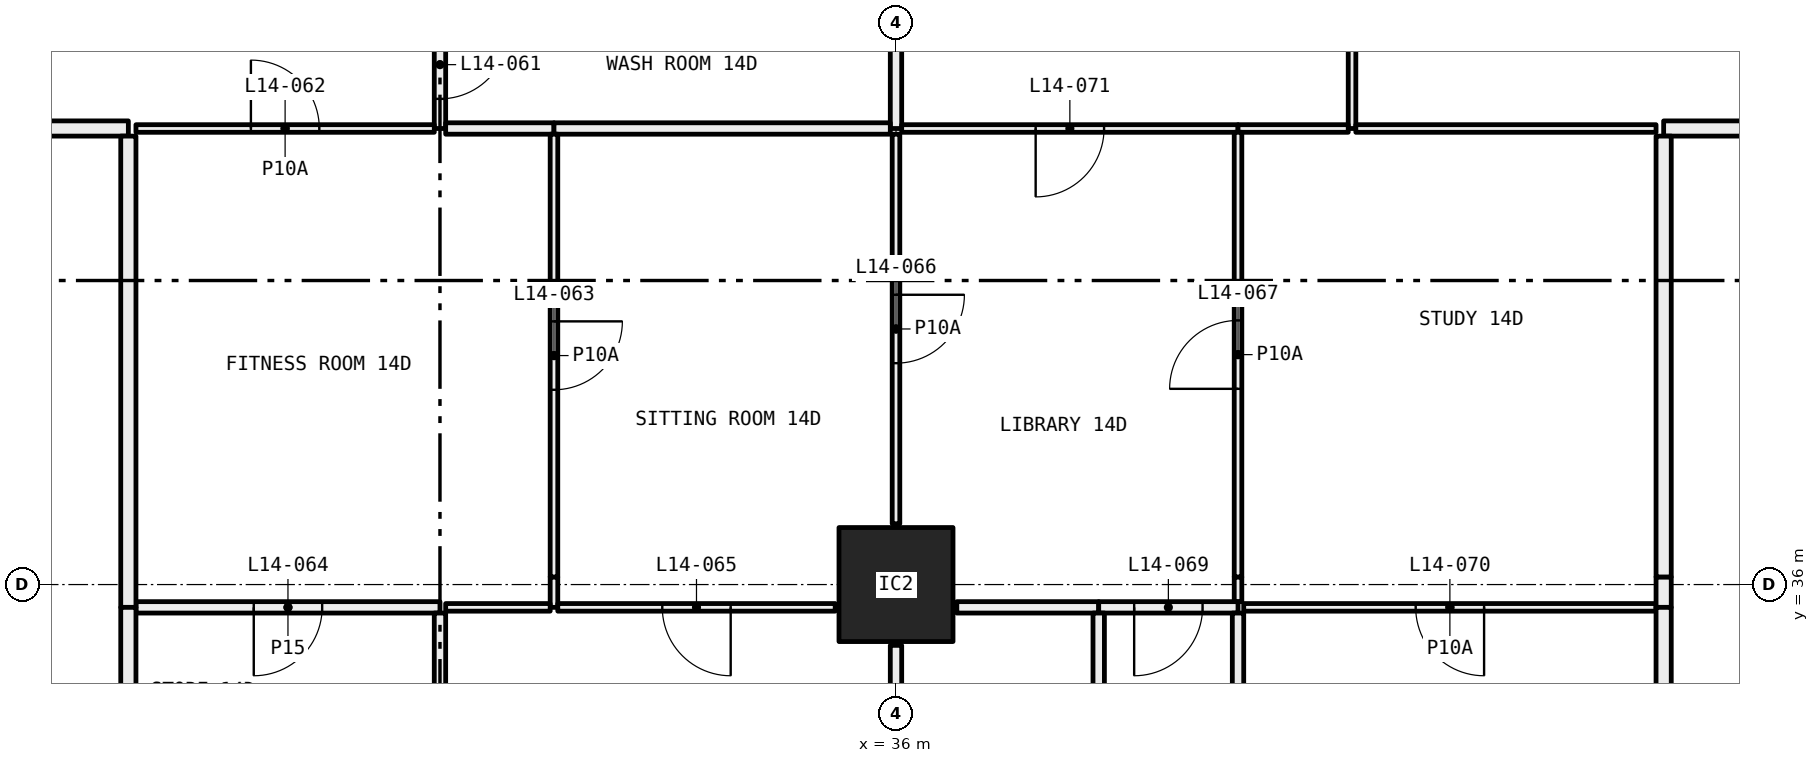
"""IFC4 building model, lengths in metres.
Left out: names, types, materials, properties, quantities, classifications, styles, units other than length and angle.
Written with IfcOpenShell. Run it as: python <this file> out.ifc"""

import sys

from ifc_helpers import new_model, si_unit, direction, frame, frame_2d, origin, origin_2d, place, context, subcontext, project, spatial, rectangle, hollow_rectangle, extrude, element, fill, save


model = new_model("IFC4")
c1 = context("Model", 3, precision=1e-05, world=origin(), true_north=direction((0.0, 1.0)))
c2 = subcontext(c1, "Body", "Model", "MODEL_VIEW")
j1 = project(units=[si_unit("LENGTHUNIT", "METRE"), si_unit("PLANEANGLEUNIT", "RADIAN")], contexts=[c1])
p1 = place(None, origin())
s1 = spatial("IfcSite", under=j1, at=p1, CompositionType="ELEMENT")
p2 = place(p1, origin())
s2 = spatial("IfcBuilding", under=s1, at=p2, CompositionType="ELEMENT")
p3 = place(p2, frame((0.0, 0.0, 61.05)))
s3 = spatial("IfcBuildingStorey", under=s2, at=p3, CompositionType="ELEMENT", Elevation=61.05)
p4 = place(p3, frame((36.0, 36.0, 0.0), z_axis=(0.0, 0.0, 1.0), x_axis=(1.0, 0.0, 0.0)))
e1 = element("IfcColumn", 1, at=p4, inside=s3, PredefinedType="COLUMN", context=c2, shape_type="SweptSolid", body=[
    extrude(hollow_rectangle(XDim=1.5, YDim=1.5, WallThickness=0.065, at=origin_2d()), origin(), (0.0, 0.0, 1.0), 3.05),
])
p5 = place(p3, frame((30.0, 42.0, 0.0), z_axis=(0.0, 0.0, 1.0), x_axis=(0.0, 1.0, 0.0)))
e2 = element("IfcWall", 2, at=p5, inside=s3, PredefinedType="PARTITIONING", context=c2, shape_type="SweptSolid", body=[
    extrude(rectangle(XDim=1.68, YDim=0.15, at=frame_2d((0.84, 0.0))), origin(), (0.0, 0.0, 1.0), 3.05),
])
p6 = place(p5, frame((0.39, 0.0, 0.0)))
e3 = element("IfcOpeningElement", 3, at=p6, cuts=e2, PredefinedType="OPENING", context=c2, shape_type="SweptSolid", body=[
    extrude(rectangle(XDim=0.9, YDim=2.1, at=frame_2d((0.45, 1.05))), frame((0.0, 0.085, 0.0), z_axis=(0.0, -1.0, 0.0), x_axis=(1.0, 0.0, 0.0)), (0.0, 0.0, 1.0), 0.17),
])
p7 = place(p3, frame((26.0, 42.0, 0.0), z_axis=(0.0, 0.0, 1.0), x_axis=(1.0, 0.0, 0.0)))
e4 = element("IfcWall", 4, at=p7, inside=s3, PredefinedType="PARTITIONING", context=c2, shape_type="SweptSolid", body=[
    extrude(rectangle(XDim=3.925, YDim=0.1, at=frame_2d((1.962, 0.0))), origin(), (0.0, 0.0, 1.0), 3.05),
])
p8 = place(p7, frame((1.512, 0.0, 0.0)))
e5 = element("IfcOpeningElement", 5, at=p8, cuts=e4, PredefinedType="OPENING", context=c2, shape_type="SweptSolid", body=[
    extrude(rectangle(XDim=0.9, YDim=2.1, at=frame_2d((0.45, 1.05))), frame((0.0, 0.06, 0.0), z_axis=(0.0, -1.0, 0.0), x_axis=(1.0, 0.0, 0.0)), (0.0, 0.0, 1.0), 0.12),
])
p9 = place(p3, frame((24.0, 42.0, 0.0), z_axis=(0.0, 0.0, 1.0), x_axis=(1.0, 0.0, 0.0)))
e6 = element("IfcWall", 6, at=p9, inside=s3, PredefinedType="PARTITIONING", context=c2, shape_type="SweptSolid", body=[
    extrude(rectangle(XDim=1.9, YDim=0.2, at=frame_2d((0.95, 0.0))), origin(), (0.0, 0.0, 1.0), 3.05),
])
p10 = place(p3, frame((36.0, 42.0, 0.0), z_axis=(0.0, 0.0, 1.0), x_axis=(0.0, 1.0, 0.0)))
e7 = element("IfcWall", 7, at=p10, inside=s3, PredefinedType="PARTITIONING", context=c2, shape_type="SweptSolid", body=[
    extrude(rectangle(XDim=1.605, YDim=0.15, at=frame_2d((0.802, 0.0))), origin(), (0.0, 0.0, 1.0), 2.45),
])
p11 = place(p3, frame((30.075, 42.0, 0.0), z_axis=(0.0, 0.0, 1.0), x_axis=(1.0, 0.0, 0.0)))
e8 = element("IfcWall", 8, at=p11, inside=s3, PredefinedType="PARTITIONING", context=c2, shape_type="SweptSolid", body=[
    extrude(rectangle(XDim=1.425, YDim=0.15, at=frame_2d((0.712, 0.0))), origin(), (0.0, 0.0, 1.0), 3.05),
])
p12 = place(p3, frame((31.5, 42.0, 0.0), z_axis=(0.0, 0.0, 1.0), x_axis=(1.0, 0.0, 0.0)))
e9 = element("IfcWall", 9, at=p12, inside=s3, PredefinedType="PARTITIONING", context=c2, shape_type="SweptSolid", body=[
    extrude(rectangle(XDim=4.425, YDim=0.15, at=frame_2d((2.212, 0.0))), origin(), (0.0, 0.0, 1.0), 2.45),
])
p13 = place(p3, frame((42.0, 42.0, 0.0), z_axis=(0.0, 0.0, 1.0), x_axis=(0.0, 1.0, 0.0)))
e10 = element("IfcWall", 10, at=p13, inside=s3, PredefinedType="PARTITIONING", context=c2, shape_type="SweptSolid", body=[
    extrude(rectangle(XDim=5.28, YDim=0.1, at=frame_2d((2.64, 0.0))), origin(), (0.0, 0.0, 1.0), 3.05),
])
p14 = place(p13, frame((2.19, 0.0, 0.0)))
e11 = element("IfcOpeningElement", 11, at=p14, cuts=e10, PredefinedType="OPENING", context=c2, shape_type="SweptSolid", body=[
    extrude(rectangle(XDim=0.9, YDim=2.1, at=frame_2d((0.45, 1.05))), frame((0.0, 0.06, 0.0), z_axis=(0.0, -1.0, 0.0), x_axis=(1.0, 0.0, 0.0)), (0.0, 0.0, 1.0), 0.12),
])
p15 = place(p3, frame((36.075, 42.0, 0.0), z_axis=(0.0, 0.0, 1.0), x_axis=(1.0, 0.0, 0.0)))
e12 = element("IfcWall", 12, at=p15, inside=s3, PredefinedType="PARTITIONING", context=c2, shape_type="SweptSolid", body=[
    extrude(rectangle(XDim=4.425, YDim=0.1, at=frame_2d((2.212, 0.0))), origin(), (0.0, 0.0, 1.0), 2.45),
])
p16 = place(p15, frame((1.762, 0.0, 0.0)))
e13 = element("IfcOpeningElement", 13, at=p16, cuts=e12, PredefinedType="OPENING", context=c2, shape_type="SweptSolid", body=[
    extrude(rectangle(XDim=0.9, YDim=2.1, at=frame_2d((0.45, 1.05))), frame((0.0, 0.06, 0.0), z_axis=(0.0, -1.0, 0.0), x_axis=(1.0, 0.0, 0.0)), (0.0, 0.0, 1.0), 0.12),
])
p17 = place(p3, frame((40.5, 42.0, 0.0), z_axis=(0.0, 0.0, 1.0), x_axis=(1.0, 0.0, 0.0)))
e14 = element("IfcWall", 14, at=p17, inside=s3, PredefinedType="PARTITIONING", context=c2, shape_type="SweptSolid", body=[
    extrude(rectangle(XDim=1.45, YDim=0.1, at=frame_2d((0.725, 0.0))), origin(), (0.0, 0.0, 1.0), 3.05),
])
p18 = place(p3, frame((42.05, 42.0, 0.0), z_axis=(0.0, 0.0, 1.0), x_axis=(1.0, 0.0, 0.0)))
e15 = element("IfcWall", 15, at=p18, inside=s3, PredefinedType="PARTITIONING", context=c2, shape_type="SweptSolid", body=[
    extrude(rectangle(XDim=3.95, YDim=0.1, at=frame_2d((1.975, 0.0))), origin(), (0.0, 0.0, 1.0), 3.05),
])
p19 = place(p3, frame((46.1, 42.0, 0.0), z_axis=(0.0, 0.0, 1.0), x_axis=(1.0, 0.0, 0.0)))
e16 = element("IfcWall", 16, at=p19, inside=s3, PredefinedType="PARTITIONING", context=c2, shape_type="SweptSolid", body=[
    extrude(rectangle(XDim=1.9, YDim=0.2, at=frame_2d((0.95, 0.0))), origin(), (0.0, 0.0, 1.0), 3.05),
])
p20 = place(p3, frame((31.5, 35.7, 0.0), z_axis=(0.0, 0.0, 1.0), x_axis=(0.0, 1.0, 0.0)))
e17 = element("IfcWall", 17, at=p20, inside=s3, PredefinedType="PARTITIONING", context=c2, shape_type="SweptSolid", body=[
    extrude(rectangle(XDim=0.4, YDim=0.1, at=frame_2d((0.2, 0.0))), origin(), (0.0, 0.0, 1.0), 2.45),
])
p21 = place(p3, frame((31.5, 36.1, 0.0), z_axis=(0.0, 0.0, 1.0), x_axis=(0.0, 1.0, 0.0)))
e18 = element("IfcWall", 18, at=p21, inside=s3, PredefinedType="PARTITIONING", context=c2, shape_type="SweptSolid", body=[
    extrude(rectangle(XDim=5.825, YDim=0.1, at=frame_2d((2.913, 0.0))), origin(), (0.0, 0.0, 1.0), 3.05),
])
p22 = place(p21, frame((2.462, 0.0, 0.0)))
e19 = element("IfcOpeningElement", 19, at=p22, cuts=e18, PredefinedType="OPENING", context=c2, shape_type="SweptSolid", body=[
    extrude(rectangle(XDim=0.9, YDim=2.1, at=frame_2d((0.45, 1.05))), frame((0.0, 0.06, 0.0), z_axis=(0.0, -1.0, 0.0), x_axis=(1.0, 0.0, 0.0)), (0.0, 0.0, 1.0), 0.12),
])
p23 = place(p3, frame((26.0, 35.7, 0.0), z_axis=(0.0, 0.0, 1.0), x_axis=(1.0, 0.0, 0.0)))
e20 = element("IfcWall", 20, at=p23, inside=s3, PredefinedType="PARTITIONING", context=c2, shape_type="SweptSolid", body=[
    extrude(rectangle(XDim=4.0, YDim=0.15, at=frame_2d((2.0, 0.0))), origin(), (0.0, 0.0, 1.0), 3.05),
])
p24 = place(p23, frame((1.55, 0.0, 0.0)))
e21 = element("IfcOpeningElement", 21, at=p24, cuts=e20, PredefinedType="OPENING", context=c2, shape_type="SweptSolid", body=[
    extrude(rectangle(XDim=0.9, YDim=2.1, at=frame_2d((0.45, 1.05))), frame((0.0, 0.085, 0.0), z_axis=(0.0, -1.0, 0.0), x_axis=(1.0, 0.0, 0.0)), (0.0, 0.0, 1.0), 0.17),
])
p25 = place(p3, frame((30.075, 35.7, 0.0), z_axis=(0.0, 0.0, 1.0), x_axis=(1.0, 0.0, 0.0)))
e22 = element("IfcWall", 22, at=p25, inside=s3, PredefinedType="PARTITIONING", context=c2, shape_type="SweptSolid", body=[
    extrude(rectangle(XDim=1.375, YDim=0.1, at=frame_2d((0.688, 0.0))), origin(), (0.0, 0.0, 1.0), 3.05),
])
p26 = place(p3, frame((25.9, 41.9, 0.0), z_axis=(0.0, 0.0, 1.0), x_axis=(0.0, -1.0, 0.0)))
e23 = element("IfcWall", 23, at=p26, inside=s3, PredefinedType="PARTITIONING", context=c2, shape_type="SweptSolid", body=[
    extrude(rectangle(XDim=6.2, YDim=0.2, at=frame_2d((3.1, 0.0))), origin(), (0.0, 0.0, 1.0), 2.45),
])
p27 = place(p3, frame((31.55, 35.7, 0.0), z_axis=(0.0, 0.0, 1.0), x_axis=(1.0, 0.0, 0.0)))
e24 = element("IfcWall", 24, at=p27, inside=s3, PredefinedType="PARTITIONING", context=c2, shape_type="SweptSolid", body=[
    extrude(rectangle(XDim=3.65, YDim=0.1, at=frame_2d((1.825, 0.0))), origin(), (0.0, 0.0, 1.0), 3.05),
])
p28 = place(p27, frame((1.375, 0.0, 0.0)))
e25 = element("IfcOpeningElement", 25, at=p28, cuts=e24, PredefinedType="OPENING", context=c2, shape_type="SweptSolid", body=[
    extrude(rectangle(XDim=0.9, YDim=2.1, at=frame_2d((0.45, 1.05))), frame((0.0, 0.06, 0.0), z_axis=(0.0, -1.0, 0.0), x_axis=(1.0, 0.0, 0.0)), (0.0, 0.0, 1.0), 0.12),
])
p29 = place(p3, frame((36.0, 36.8, 0.0), z_axis=(0.0, 0.0, 1.0), x_axis=(0.0, 1.0, 0.0)))
e26 = element("IfcWall", 26, at=p29, inside=s3, PredefinedType="PARTITIONING", context=c2, shape_type="SweptSolid", body=[
    extrude(rectangle(XDim=5.125, YDim=0.1, at=frame_2d((2.562, 0.0))), origin(), (0.0, 0.0, 1.0), 2.45),
])
p30 = place(p29, frame((2.113, 0.0, 0.0)))
e27 = element("IfcOpeningElement", 27, at=p30, cuts=e26, PredefinedType="OPENING", context=c2, shape_type="SweptSolid", body=[
    extrude(rectangle(XDim=0.9, YDim=2.1, at=frame_2d((0.45, 1.05))), frame((0.0, 0.06, 0.0), z_axis=(0.0, -1.0, 0.0), x_axis=(1.0, 0.0, 0.0)), (0.0, 0.0, 1.0), 0.12),
])
p31 = place(p3, frame((30.0, 33.675, 0.0), z_axis=(0.0, 0.0, 1.0), x_axis=(0.0, 1.0, 0.0)))
e28 = element("IfcWall", 28, at=p31, inside=s3, PredefinedType="PARTITIONING", context=c2, shape_type="SweptSolid", body=[
    extrude(rectangle(XDim=1.95, YDim=0.15, at=frame_2d((0.975, 0.0))), origin(), (0.0, 0.0, 1.0), 3.05),
])
p32 = place(p3, frame((25.9, 35.7, 0.0), z_axis=(0.0, 0.0, 1.0), x_axis=(0.0, -1.0, 0.0)))
e29 = element("IfcWall", 29, at=p32, inside=s3, PredefinedType="PARTITIONING", context=c2, shape_type="SweptSolid", body=[
    extrude(rectangle(XDim=2.1, YDim=0.2, at=frame_2d((1.05, 0.0))), origin(), (0.0, 0.0, 1.0), 3.05),
])
p33 = place(p3, frame((36.0, 31.3, 0.0), z_axis=(0.0, 0.0, 1.0), x_axis=(0.0, 1.0, 0.0)))
e30 = element("IfcWall", 30, at=p33, inside=s3, PredefinedType="PARTITIONING", context=c2, shape_type="SweptSolid", body=[
    extrude(rectangle(XDim=3.9, YDim=0.15, at=frame_2d((1.95, 0.0))), origin(), (0.0, 0.0, 1.0), 2.45),
])
p34 = place(p33, frame((1.5, 0.0, 0.0)))
e31 = element("IfcOpeningElement", 31, at=p34, cuts=e30, PredefinedType="OPENING", context=c2, shape_type="SweptSolid", body=[
    extrude(rectangle(XDim=0.9, YDim=2.1, at=frame_2d((0.45, 1.05))), frame((0.0, 0.085, 0.0), z_axis=(0.0, -1.0, 0.0), x_axis=(1.0, 0.0, 0.0)), (0.0, 0.0, 1.0), 0.17),
])
p35 = place(p3, frame((40.5, 35.775, 0.0), z_axis=(0.0, 0.0, 1.0), x_axis=(0.0, 1.0, 0.0)))
e32 = element("IfcWall", 32, at=p35, inside=s3, PredefinedType="PARTITIONING", context=c2, shape_type="SweptSolid", body=[
    extrude(rectangle(XDim=0.325, YDim=0.1, at=frame_2d((0.163, 0.0))), origin(), (0.0, 0.0, 1.0), 2.45),
])
p36 = place(p3, frame((40.5, 36.1, 0.0), z_axis=(0.0, 0.0, 1.0), x_axis=(0.0, 1.0, 0.0)))
e33 = element("IfcWall", 33, at=p36, inside=s3, PredefinedType="PARTITIONING", context=c2, shape_type="SweptSolid", body=[
    extrude(rectangle(XDim=5.85, YDim=0.1, at=frame_2d((2.925, 0.0))), origin(), (0.0, 0.0, 1.0), 3.05),
])
p37 = place(p36, frame((2.475, 0.0, 0.0)))
e34 = element("IfcOpeningElement", 34, at=p37, cuts=e33, PredefinedType="OPENING", context=c2, shape_type="SweptSolid", body=[
    extrude(rectangle(XDim=0.9, YDim=2.1, at=frame_2d((0.45, 1.05))), frame((0.0, 0.06, 0.0), z_axis=(0.0, -1.0, 0.0), x_axis=(1.0, 0.0, 0.0)), (0.0, 0.0, 1.0), 0.12),
])
p38 = place(p3, frame((36.8, 35.7, 0.0), z_axis=(0.0, 0.0, 1.0), x_axis=(1.0, 0.0, 0.0)))
e35 = element("IfcWall", 35, at=p38, inside=s3, PredefinedType="PARTITIONING", context=c2, shape_type="SweptSolid", body=[
    extrude(rectangle(XDim=1.867, YDim=0.15, at=frame_2d((0.934, 0.0))), origin(), (0.0, 0.0, 1.0), 3.05),
])
p39 = place(p3, frame((38.667, 35.7, 0.0), z_axis=(0.0, 0.0, 1.0), x_axis=(1.0, 0.0, 0.0)))
e36 = element("IfcWall", 36, at=p39, inside=s3, PredefinedType="PARTITIONING", context=c2, shape_type="SweptSolid", body=[
    extrude(rectangle(XDim=1.833, YDim=0.15, at=frame_2d((0.917, 0.0))), origin(), (0.0, 0.0, 1.0), 3.05),
])
p40 = place(p39, frame((0.467, 0.0, 0.0)))
e37 = element("IfcOpeningElement", 37, at=p40, cuts=e36, PredefinedType="OPENING", context=c2, shape_type="SweptSolid", body=[
    extrude(rectangle(XDim=0.9, YDim=2.1, at=frame_2d((0.45, 1.05))), frame((0.0, 0.085, 0.0), z_axis=(0.0, -1.0, 0.0), x_axis=(1.0, 0.0, 0.0)), (0.0, 0.0, 1.0), 0.17),
])
p41 = place(p3, frame((40.575, 35.7, 0.0), z_axis=(0.0, 0.0, 1.0), x_axis=(1.0, 0.0, 0.0)))
e38 = element("IfcWall", 38, at=p41, inside=s3, PredefinedType="PARTITIONING", context=c2, shape_type="SweptSolid", body=[
    extrude(rectangle(XDim=5.425, YDim=0.1, at=frame_2d((2.712, 0.0))), origin(), (0.0, 0.0, 1.0), 3.05),
])
p42 = place(p41, frame((2.262, 0.0, 0.0)))
e39 = element("IfcOpeningElement", 39, at=p42, cuts=e38, PredefinedType="OPENING", context=c2, shape_type="SweptSolid", body=[
    extrude(rectangle(XDim=0.9, YDim=2.1, at=frame_2d((0.45, 1.05))), frame((0.0, 0.06, 0.0), z_axis=(0.0, -1.0, 0.0), x_axis=(1.0, 0.0, 0.0)), (0.0, 0.0, 1.0), 0.12),
])
p43 = place(p3, frame((46.1, 35.7, 0.0), z_axis=(0.0, 0.0, 1.0), x_axis=(0.0, 1.0, 0.0)))
e40 = element("IfcWall", 40, at=p43, inside=s3, PredefinedType="PARTITIONING", context=c2, shape_type="SweptSolid", body=[
    extrude(rectangle(XDim=0.4, YDim=0.2, at=frame_2d((0.2, 0.0))), origin(), (0.0, 0.0, 1.0), 2.45),
])
p44 = place(p3, frame((46.1, 36.1, 0.0), z_axis=(0.0, 0.0, 1.0), x_axis=(0.0, 1.0, 0.0)))
e41 = element("IfcWall", 41, at=p44, inside=s3, PredefinedType="PARTITIONING", context=c2, shape_type="SweptSolid", body=[
    extrude(rectangle(XDim=5.8, YDim=0.2, at=frame_2d((2.9, 0.0))), origin(), (0.0, 0.0, 1.0), 3.05),
])
for number, where, z_axis, x_axis in (
    (42, (38.667, 31.3, 0.0), (0.0, 0.0, 1.0), (0.0, 1.0, 0.0)),
    (43, (40.5, 31.3, 0.0), (0.0, 0.0, 1.0), (0.0, 1.0, 0.0)),
):
    element("IfcWall", number, at=place(p3, frame(where, z_axis=z_axis, x_axis=x_axis)), inside=s3, PredefinedType="PARTITIONING", context=c2, shape_type="SweptSolid", body=[
        extrude(rectangle(XDim=4.325, YDim=0.15, at=frame_2d((2.163, 0.0))), origin(), (0.0, 0.0, 1.0), 3.05),
    ])
p45 = place(p3, frame((46.1, 31.3, 0.0), z_axis=(0.0, 0.0, 1.0), x_axis=(0.0, 1.0, 0.0)))
e44 = element("IfcWall", 44, at=p45, inside=s3, PredefinedType="PARTITIONING", context=c2, shape_type="SweptSolid", body=[
    extrude(rectangle(XDim=4.4, YDim=0.2, at=frame_2d((2.2, 0.0))), origin(), (0.0, 0.0, 1.0), 3.05),
])
p46 = place(p6, frame((0.9, 0.0, 0.0), x_axis=(-1.0, 0.0, 0.0)))
e45 = element("IfcDoor", 45, at=p46, inside=s3, OperationType="SINGLE_SWING_RIGHT", PredefinedType="DOOR", context=c2, shape_type="SweptSolid", body=[
    extrude(rectangle(XDim=0.9, YDim=2.1, at=frame_2d((0.45, 1.05))), frame((0.0, 0.025, 0.0), z_axis=(0.0, -1.0, 0.0), x_axis=(1.0, 0.0, 0.0)), (0.0, 0.0, 1.0), 0.05),
])
fill(e3, e45)
p47 = place(p8, origin())
e46 = element("IfcDoor", 46, at=p47, inside=s3, OperationType="SINGLE_SWING_RIGHT", PredefinedType="DOOR", context=c2, shape_type="SweptSolid", body=[
    extrude(rectangle(XDim=0.9, YDim=2.1, at=frame_2d((0.45, 1.05))), frame((0.0, 0.025, 0.0), z_axis=(0.0, -1.0, 0.0), x_axis=(1.0, 0.0, 0.0)), (0.0, 0.0, 1.0), 0.05),
])
fill(e5, e46)
p48 = place(p22, frame((0.9, 0.0, 0.0), x_axis=(-1.0, 0.0, 0.0)))
e47 = element("IfcDoor", 47, at=p48, inside=s3, OperationType="SINGLE_SWING_RIGHT", PredefinedType="DOOR", context=c2, shape_type="SweptSolid", body=[
    extrude(rectangle(XDim=0.9, YDim=2.1, at=frame_2d((0.45, 1.05))), frame((0.0, 0.025, 0.0), z_axis=(0.0, -1.0, 0.0), x_axis=(1.0, 0.0, 0.0)), (0.0, 0.0, 1.0), 0.05),
])
fill(e19, e47)
p49 = place(p24, frame((0.9, 0.0, 0.0), x_axis=(-1.0, 0.0, 0.0)))
e48 = element("IfcDoor", 48, at=p49, inside=s3, OperationType="SINGLE_SWING_LEFT", PredefinedType="DOOR", context=c2, shape_type="SweptSolid", body=[
    extrude(rectangle(XDim=0.9, YDim=2.1, at=frame_2d((0.45, 1.05))), frame((0.0, 0.025, 0.0), z_axis=(0.0, -1.0, 0.0), x_axis=(1.0, 0.0, 0.0)), (0.0, 0.0, 1.0), 0.05),
])
fill(e21, e48)
p50 = place(p28, frame((0.9, 0.0, 0.0), x_axis=(-1.0, 0.0, 0.0)))
e49 = element("IfcDoor", 49, at=p50, inside=s3, OperationType="SINGLE_SWING_RIGHT", PredefinedType="DOOR", context=c2, shape_type="SweptSolid", body=[
    extrude(rectangle(XDim=0.9, YDim=2.1, at=frame_2d((0.45, 1.05))), frame((0.0, 0.025, 0.0), z_axis=(0.0, -1.0, 0.0), x_axis=(1.0, 0.0, 0.0)), (0.0, 0.0, 1.0), 0.05),
])
fill(e25, e49)
p51 = place(p30, frame((0.9, 0.0, 0.0), x_axis=(-1.0, 0.0, 0.0)))
e50 = element("IfcDoor", 50, at=p51, inside=s3, OperationType="SINGLE_SWING_RIGHT", PredefinedType="DOOR", context=c2, shape_type="SweptSolid", body=[
    extrude(rectangle(XDim=0.9, YDim=2.1, at=frame_2d((0.45, 1.05))), frame((0.0, 0.025, 0.0), z_axis=(0.0, -1.0, 0.0), x_axis=(1.0, 0.0, 0.0)), (0.0, 0.0, 1.0), 0.05),
])
fill(e27, e50)
p52 = place(p37, origin())
e51 = element("IfcDoor", 51, at=p52, inside=s3, OperationType="SINGLE_SWING_RIGHT", PredefinedType="DOOR", context=c2, shape_type="SweptSolid", body=[
    extrude(rectangle(XDim=0.9, YDim=2.1, at=frame_2d((0.45, 1.05))), frame((0.0, 0.025, 0.0), z_axis=(0.0, -1.0, 0.0), x_axis=(1.0, 0.0, 0.0)), (0.0, 0.0, 1.0), 0.05),
])
fill(e34, e51)
p53 = place(p40, frame((0.9, 0.0, 0.0), x_axis=(-1.0, 0.0, 0.0)))
e52 = element("IfcDoor", 52, at=p53, inside=s3, OperationType="SINGLE_SWING_LEFT", PredefinedType="DOOR", context=c2, shape_type="SweptSolid", body=[
    extrude(rectangle(XDim=0.9, YDim=2.1, at=frame_2d((0.45, 1.05))), frame((0.0, 0.025, 0.0), z_axis=(0.0, -1.0, 0.0), x_axis=(1.0, 0.0, 0.0)), (0.0, 0.0, 1.0), 0.05),
])
fill(e37, e52)
p54 = place(p42, frame((0.9, 0.0, 0.0), x_axis=(-1.0, 0.0, 0.0)))
e53 = element("IfcDoor", 53, at=p54, inside=s3, OperationType="SINGLE_SWING_RIGHT", PredefinedType="DOOR", context=c2, shape_type="SweptSolid", body=[
    extrude(rectangle(XDim=0.9, YDim=2.1, at=frame_2d((0.45, 1.05))), frame((0.0, 0.025, 0.0), z_axis=(0.0, -1.0, 0.0), x_axis=(1.0, 0.0, 0.0)), (0.0, 0.0, 1.0), 0.05),
])
fill(e39, e53)
p55 = place(p16, frame((0.9, 0.0, 0.0), x_axis=(-1.0, 0.0, 0.0)))
e54 = element("IfcDoor", 54, at=p55, inside=s3, OperationType="SINGLE_SWING_LEFT", PredefinedType="DOOR", context=c2, shape_type="SweptSolid", body=[
    extrude(rectangle(XDim=0.9, YDim=2.1, at=frame_2d((0.45, 1.05))), frame((0.0, 0.025, 0.0), z_axis=(0.0, -1.0, 0.0), x_axis=(1.0, 0.0, 0.0)), (0.0, 0.0, 1.0), 0.05),
])
fill(e13, e54)
save(model, sys.argv[1])
